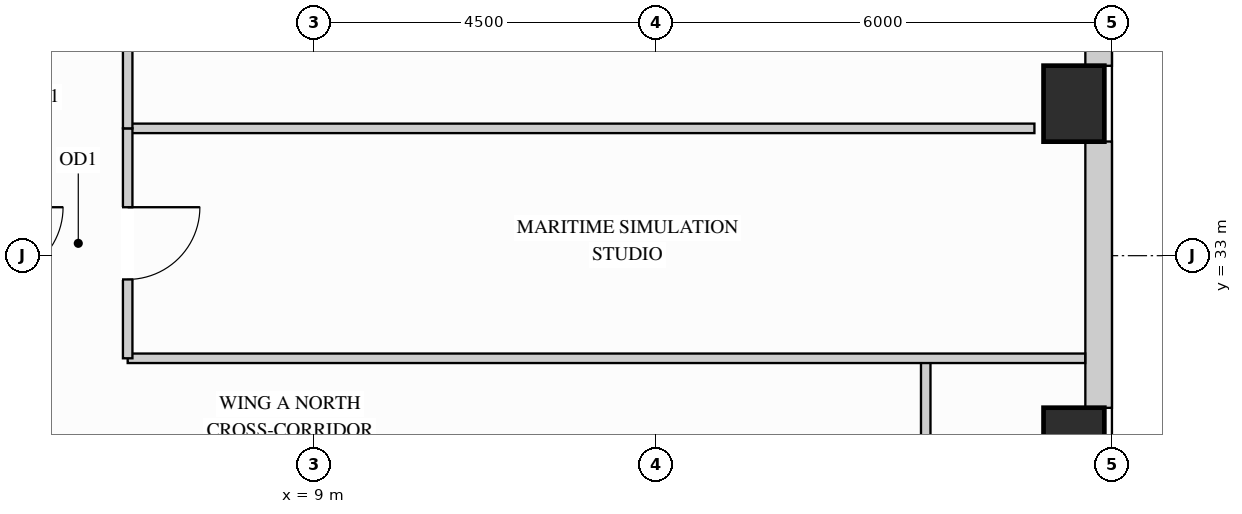
"""IFC4 building model, lengths in metres.
Left out: names, types, materials, properties, quantities, classifications, styles, units other than length and angle.
Written with IfcOpenShell. Run it as: python <this file> out.ifc"""

import sys

from ifc_helpers import new_model, si_unit, direction, frame, frame_2d, origin, origin_2d, place, context, subcontext, project, spatial, rectangle, extrude, source, transform, mapped, element, fill, save


model = new_model("IFC4")
c1 = context("Model", 3, precision=1e-05, world=origin(), true_north=direction((0.0, 1.0)))
c2 = subcontext(c1, "Body", "Model", "MODEL_VIEW")
j1 = project(units=[si_unit("LENGTHUNIT", "METRE"), si_unit("PLANEANGLEUNIT", "RADIAN")], contexts=[c1])
p1 = place(None, origin())
s1 = spatial("IfcSite", under=j1, at=p1, CompositionType="ELEMENT")
p2 = place(p1, origin())
s2 = spatial("IfcBuilding", under=s1, at=p2, CompositionType="ELEMENT")
p3 = place(p2, frame((0.0, 0.0, 168.3)))
s3 = spatial("IfcBuildingStorey", under=s2, at=p3, CompositionType="ELEMENT", Elevation=168.3)
m1 = source(origin(), c2, "Body", "SweptSolid", [
    extrude(rectangle(XDim=0.8, YDim=1.0, at=origin_2d()), origin(), (0.0, 0.0, 1.0), 3.4),
])
for number, where, z_axis, x_axis in (
    (1, (19.0, 30.5, 0.0), (0.0, 0.0, 1.0), (1.0, 0.0, 0.0)),
    (2, (19.0, 35.0, 0.0), (0.0, 0.0, 1.0), (1.0, 0.0, 0.0)),
):
    element("IfcColumn", number, at=place(p3, frame(where, z_axis=z_axis, x_axis=x_axis)), inside=s3, PredefinedType="COLUMN", context=c2, shape_type="MappedRepresentation", body=[
        mapped(m1, transform((0.0, 0.0, 0.0), x_axis=(1.0, 0.0, 0.0), y_axis=(0.0, 1.0, 0.0), z_axis=(0.0, 0.0, 1.0))),
    ])
m2 = source(origin(), c2, "Body", "SweptSolid", [
    extrude(rectangle(XDim=3.504, YDim=0.35, at=frame_2d((1.752, 0.0))), origin(), (0.0, 0.0, 1.0), 2.612),
])
p4 = place(p3, frame((19.325, 30.998, 0.0), z_axis=(0.0, 0.0, 1.0), x_axis=(0.0, 1.0, 0.0)))
e3 = element("IfcWall", 3, at=p4, inside=s3, PredefinedType="SOLIDWALL", context=c2, shape_type="MappedRepresentation", body=[
    mapped(m2, transform((0.0, 0.0, 0.0), x_axis=(1.0, 0.0, 0.0), y_axis=(0.0, 1.0, 0.0), z_axis=(0.0, 0.0, 1.0))),
])
m3 = source(origin(), c2, "Body", "SweptSolid", [
    extrude(rectangle(XDim=1.904, YDim=0.35, at=frame_2d((0.952, 0.0))), origin(), (0.0, 0.0, 1.0), 2.612),
])
p5 = place(p3, frame((19.325, 35.498, 0.0), z_axis=(0.0, 0.0, 1.0), x_axis=(0.0, 1.0, 0.0)))
e4 = element("IfcWall", 4, at=p5, inside=s3, PredefinedType="SOLIDWALL", context=c2, shape_type="MappedRepresentation", body=[
    mapped(m3, transform((0.0, 0.0, 0.0), x_axis=(1.0, 0.0, 0.0), y_axis=(0.0, 1.0, 0.0), z_axis=(0.0, 0.0, 1.0))),
])
p6 = place(p3, frame((17.05, 26.05, 0.0), z_axis=(0.0, 0.0, 1.0), x_axis=(0.0, 1.0, 0.0)))
e5 = element("IfcWall", 5, at=p6, inside=s3, PredefinedType="PARTITIONING", context=c2, shape_type="SweptSolid", body=[
    extrude(rectangle(XDim=5.6, YDim=0.125, at=frame_2d((2.8, 0.0))), origin(), (0.0, 0.0, 1.0), 3.385),
])
p7 = place(p6, frame((2.325, 0.0, 0.0)))
e6 = element("IfcOpeningElement", 6, at=p7, cuts=e5, PredefinedType="OPENING", context=c2, shape_type="SweptSolid", body=[
    extrude(rectangle(XDim=0.95, YDim=2.15, at=frame_2d((0.475, 1.075))), frame((0.0, 0.073, 0.0), z_axis=(0.0, -1.0, 0.0), x_axis=(1.0, 0.0, 0.0)), (0.0, 0.0, 1.0), 0.145),
])
m4 = source(origin(), c2, "Body", "SweptSolid", [
    extrude(rectangle(XDim=11.93, YDim=0.125, at=frame_2d((5.965, 0.0))), origin(), (0.0, 0.0, 1.0), 2.448),
])
p8 = place(p3, frame((6.55, 34.675, 0.0), z_axis=(0.0, 0.0, 1.0), x_axis=(1.0, 0.0, 0.0)))
e7 = element("IfcWall", 7, at=p8, inside=s3, PredefinedType="PARTITIONING", context=c2, shape_type="MappedRepresentation", body=[
    mapped(m4, transform((0.0, 0.0, 0.0), x_axis=(1.0, 0.0, 0.0), y_axis=(0.0, 1.0, 0.0), z_axis=(0.0, 0.0, 1.0))),
])
m5 = source(origin(), c2, "Body", "SweptSolid", [
    extrude(rectangle(XDim=12.598, YDim=0.125, at=frame_2d((6.299, 0.0))), origin(), (0.0, 0.0, 1.0), 2.848),
])
p9 = place(p3, frame((6.55, 31.65, 0.0), z_axis=(0.0, 0.0, 1.0), x_axis=(1.0, 0.0, 0.0)))
e8 = element("IfcWall", 8, at=p9, inside=s3, PredefinedType="PARTITIONING", context=c2, shape_type="MappedRepresentation", body=[
    mapped(m5, transform((0.0, 0.0, 0.0), x_axis=(1.0, 0.0, 0.0), y_axis=(0.0, 1.0, 0.0), z_axis=(0.0, 0.0, 1.0))),
])
p10 = place(p3, frame((6.55, 31.65, 0.0), z_axis=(0.0, 0.0, 1.0), x_axis=(0.0, 1.0, 0.0)))
e9 = element("IfcWall", 9, at=p10, inside=s3, PredefinedType="PARTITIONING", context=c2, shape_type="SweptSolid", body=[
    extrude(rectangle(XDim=3.025, YDim=0.125, at=frame_2d((1.513, 0.0))), origin(), (0.0, 0.0, 1.0), 3.385),
])
p11 = place(p10, frame((1.038, 0.0, 0.0)))
e10 = element("IfcOpeningElement", 10, at=p11, cuts=e9, PredefinedType="OPENING", context=c2, shape_type="SweptSolid", body=[
    extrude(rectangle(XDim=0.95, YDim=2.15, at=frame_2d((0.475, 1.075))), frame((0.0, 0.073, 0.0), z_axis=(0.0, -1.0, 0.0), x_axis=(1.0, 0.0, 0.0)), (0.0, 0.0, 1.0), 0.145),
])
p12 = place(p3, frame((6.55, 34.675, 0.0), z_axis=(0.0, 0.0, 1.0), x_axis=(0.0, 1.0, 0.0)))
e11 = element("IfcWall", 11, at=p12, inside=s3, PredefinedType="PARTITIONING", context=c2, shape_type="SweptSolid", body=[
    extrude(rectangle(XDim=3.025, YDim=0.125, at=frame_2d((1.512, 0.0))), origin(), (0.0, 0.0, 1.0), 3.385),
])
p13 = place(p12, frame((1.038, 0.0, 0.0)))
e12 = element("IfcOpeningElement", 12, at=p13, cuts=e11, PredefinedType="OPENING", context=c2, shape_type="SweptSolid", body=[
    extrude(rectangle(XDim=0.95, YDim=2.15, at=frame_2d((0.475, 1.075))), frame((0.0, 0.073, 0.0), z_axis=(0.0, -1.0, 0.0), x_axis=(1.0, 0.0, 0.0)), (0.0, 0.0, 1.0), 0.145),
])
m6 = source(origin(), c2, "Body", "SweptSolid", [
    extrude(rectangle(XDim=0.95, YDim=2.15, at=frame_2d((0.475, 1.075))), frame((0.0, 0.025, 0.0), z_axis=(0.0, -1.0, 0.0), x_axis=(1.0, 0.0, 0.0)), (0.0, 0.0, 1.0), 0.05),
])
p14 = place(p11, origin())
e13 = element("IfcDoor", 13, at=p14, inside=s3, OperationType="SINGLE_SWING_RIGHT", PredefinedType="DOOR", context=c2, shape_type="MappedRepresentation", body=[
    mapped(m6, transform((0.0, 0.0, 0.0), x_axis=(1.0, 0.0, 0.0), y_axis=(0.0, 1.0, 0.0), z_axis=(0.0, 0.0, 1.0))),
])
fill(e10, e13)
save(model, sys.argv[1])
